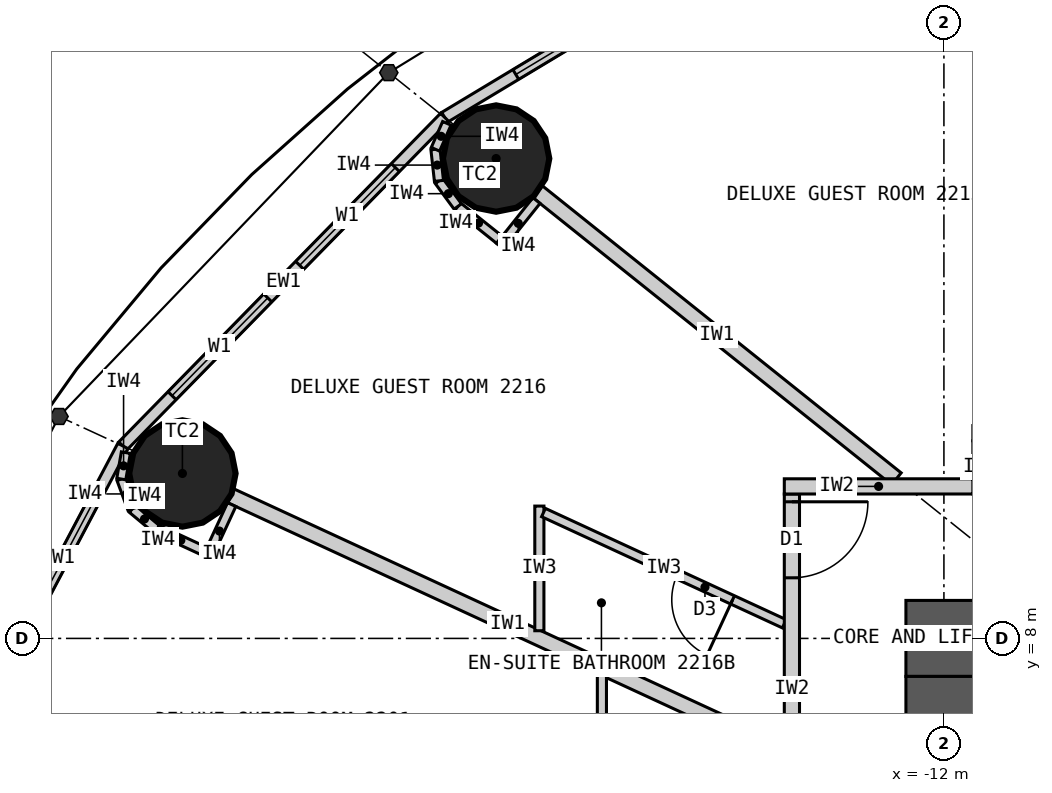
"""IFC4 building model, lengths in metres.
Left out: names, types, materials, properties, quantities, classifications, styles, units other than length and angle.
Written with IfcOpenShell. Run it as: python <this file> out.ifc"""

import sys

from ifc_helpers import new_model, si_unit, direction, frame, frame_2d, origin, origin_2d, place, context, subcontext, project, spatial, rectangle, circle, extrude, element, fill, save


model = new_model("IFC4")
c1 = context("Model", 3, precision=1e-05, world=origin(), true_north=direction((0.0, 1.0)))
c2 = subcontext(c1, "Body", "Model", "MODEL_VIEW")
j1 = project(units=[si_unit("LENGTHUNIT", "METRE"), si_unit("PLANEANGLEUNIT", "RADIAN")], contexts=[c1])
p1 = place(None, origin())
s1 = spatial("IfcSite", under=j1, at=p1, CompositionType="ELEMENT")
p2 = place(p1, origin())
s2 = spatial("IfcBuilding", under=s1, at=p2, CompositionType="ELEMENT")
p3 = place(p2, frame((0.0, 0.0, 87.0)))
s3 = spatial("IfcBuildingStorey", under=s2, at=p3, CompositionType="ELEMENT", Elevation=87.0)
for number, where, z_axis, x_axis in (
    (1, (-17.892, 14.313, 0.0), (0.0, 0.0, 1.0), (1.0, 0.0, 0.0)),
    (2, (-22.019, 10.17, 0.0), (0.0, 0.0, 1.0), (1.0, 0.0, 0.0)),
):
    element("IfcColumn", number, at=place(p3, frame(where, z_axis=z_axis, x_axis=x_axis)), inside=s3, PredefinedType="COLUMN", context=c2, shape_type="SweptSolid", body=[
        extrude(circle(Radius=0.7, at=origin_2d()), origin(), (0.0, 0.0, 1.0), 3.3),
    ])
p4 = place(p3, frame((-12.5, 8.0, 0.0), z_axis=(0.0, 0.0, 1.0), x_axis=(1.0, 0.0, 0.0)))
e3 = element("IfcWall", 3, at=p4, inside=s3, PredefinedType="SHEAR", context=c2, shape_type="SweptSolid", body=[
    extrude(rectangle(XDim=25.0, YDim=1.0, at=frame_2d((12.5, 0.0))), origin(), (0.0, 0.0, 1.0), 3.3),
])
p5 = place(p4, frame((11.2, 0.0, 0.0)))
e4 = element("IfcOpeningElement", 4, at=p5, cuts=e3, PredefinedType="OPENING", context=c2, shape_type="SweptSolid", body=[
    extrude(rectangle(XDim=1.2, YDim=2.2, at=frame_2d((0.6, 1.1))), frame((0.0, 0.51, 0.0), z_axis=(0.0, -1.0, 0.0), x_axis=(1.0, 0.0, 0.0)), (0.0, 0.0, 1.0), 1.02),
])
p6 = place(p4, frame((18.8, 0.0, 0.0)))
e5 = element("IfcOpeningElement", 5, at=p6, cuts=e3, PredefinedType="OPENING", context=c2, shape_type="SweptSolid", body=[
    extrude(rectangle(XDim=0.9, YDim=2.2, at=frame_2d((0.45, 1.1))), frame((0.0, 0.51, 0.0), z_axis=(0.0, -1.0, 0.0), x_axis=(1.0, 0.0, 0.0)), (0.0, 0.0, 1.0), 1.02),
])
p7 = place(p3, frame((-12.0, 7.5, 0.0), z_axis=(0.0, 0.0, 1.0), x_axis=(0.0, -1.0, 0.0)))
e6 = element("IfcWall", 6, at=p7, inside=s3, PredefinedType="SHEAR", context=c2, shape_type="SweptSolid", body=[
    extrude(rectangle(XDim=15.0, YDim=1.0, at=frame_2d((7.5, 0.0))), origin(), (0.0, 0.0, 1.0), 3.3),
])
p8 = place(p7, frame((6.6, 0.0, 0.0)))
e7 = element("IfcOpeningElement", 7, at=p8, cuts=e6, PredefinedType="OPENING", context=c2, shape_type="SweptSolid", body=[
    extrude(rectangle(XDim=1.8, YDim=2.2, at=frame_2d((0.9, 1.1))), frame((0.0, 0.51, 0.0), z_axis=(0.0, -1.0, 0.0), x_axis=(1.0, 0.0, 0.0)), (0.0, 0.0, 1.0), 1.02),
])
p9 = place(p3, frame((-13.096, 18.147, 0.0), z_axis=(0.0, 0.0, 1.0), x_axis=(-0.856983180864, -0.515344377787, 0.0)))
e8 = element("IfcWall", 8, at=p9, inside=s3, PredefinedType="ELEMENTEDWALL", context=c2, shape_type="SweptSolid", body=[
    extrude(rectangle(XDim=6.386, YDim=0.15, at=frame_2d((3.193, 0.0))), origin(), (0.0, 0.0, 1.0), 3.12),
])
p10 = place(p9, frame((1.093, 0.0, 0.9)))
e9 = element("IfcOpeningElement", 9, at=p10, cuts=e8, PredefinedType="OPENING", context=c2, shape_type="SweptSolid", body=[
    extrude(rectangle(XDim=1.8, YDim=1.9, at=frame_2d((0.9, 0.95))), frame((0.0, 0.085, 0.0), z_axis=(0.0, -1.0, 0.0), x_axis=(1.0, 0.0, 0.0)), (0.0, 0.0, 1.0), 0.17),
])
p11 = place(p9, frame((3.493, 0.0, 0.9)))
e10 = element("IfcOpeningElement", 10, at=p11, cuts=e8, PredefinedType="OPENING", context=c2, shape_type="SweptSolid", body=[
    extrude(rectangle(XDim=1.8, YDim=1.9, at=frame_2d((0.9, 0.95))), frame((0.0, 0.085, 0.0), z_axis=(0.0, -1.0, 0.0), x_axis=(1.0, 0.0, 0.0)), (0.0, 0.0, 1.0), 0.17),
])
p12 = place(p3, frame((-18.57, 14.856, 0.0), z_axis=(0.0, 0.0, 1.0), x_axis=(-0.699602905915, -0.714531856557, 0.0)))
e11 = element("IfcWall", 11, at=p12, inside=s3, PredefinedType="ELEMENTEDWALL", context=c2, shape_type="SweptSolid", body=[
    extrude(rectangle(XDim=6.051, YDim=0.15, at=frame_2d((3.025, 0.0))), origin(), (0.0, 0.0, 1.0), 3.12),
])
p13 = place(p12, frame((0.926, 0.0, 0.9)))
e12 = element("IfcOpeningElement", 12, at=p13, cuts=e11, PredefinedType="OPENING", context=c2, shape_type="SweptSolid", body=[
    extrude(rectangle(XDim=1.8, YDim=1.9, at=frame_2d((0.9, 0.95))), frame((0.0, 0.085, 0.0), z_axis=(0.0, -1.0, 0.0), x_axis=(1.0, 0.0, 0.0)), (0.0, 0.0, 1.0), 0.17),
])
p14 = place(p12, frame((3.325, 0.0, 0.9)))
e13 = element("IfcOpeningElement", 13, at=p14, cuts=e11, PredefinedType="OPENING", context=c2, shape_type="SweptSolid", body=[
    extrude(rectangle(XDim=1.8, YDim=1.9, at=frame_2d((0.9, 0.95))), frame((0.0, 0.085, 0.0), z_axis=(0.0, -1.0, 0.0), x_axis=(1.0, 0.0, 0.0)), (0.0, 0.0, 1.0), 0.17),
])
p15 = place(p3, frame((-22.803, 10.532, 0.0), z_axis=(0.0, 0.0, 1.0), x_axis=(-0.467296867008, -0.884100468321, 0.0)))
e14 = element("IfcWall", 14, at=p15, inside=s3, PredefinedType="ELEMENTEDWALL", context=c2, shape_type="SweptSolid", body=[
    extrude(rectangle(XDim=5.734, YDim=0.15, at=frame_2d((2.867, 0.0))), origin(), (0.0, 0.0, 1.0), 3.12),
])
p16 = place(p15, frame((0.767, 0.0, 0.9)))
e15 = element("IfcOpeningElement", 15, at=p16, cuts=e14, PredefinedType="OPENING", context=c2, shape_type="SweptSolid", body=[
    extrude(rectangle(XDim=1.8, YDim=1.9, at=frame_2d((0.9, 0.95))), frame((0.0, 0.085, 0.0), z_axis=(0.0, -1.0, 0.0), x_axis=(1.0, 0.0, 0.0)), (0.0, 0.0, 1.0), 0.17),
])
p17 = place(p15, frame((3.167, 0.0, 0.9)))
e16 = element("IfcOpeningElement", 16, at=p17, cuts=e14, PredefinedType="OPENING", context=c2, shape_type="SweptSolid", body=[
    extrude(rectangle(XDim=1.8, YDim=1.9, at=frame_2d((0.9, 0.95))), frame((0.0, 0.085, 0.0), z_axis=(0.0, -1.0, 0.0), x_axis=(1.0, 0.0, 0.0)), (0.0, 0.0, 1.0), 0.17),
])
p18 = place(p3, frame((-7.289, 10.1, 0.0), z_axis=(0.0, 0.0, 1.0), x_axis=(-0.585198353053, 0.810890182197, 0.0)))
e17 = element("IfcWall", 17, at=p18, inside=s3, PredefinedType="PARTITIONING", context=c2, shape_type="SweptSolid", body=[
    extrude(rectangle(XDim=8.36, YDim=0.2, at=frame_2d((4.18, 0.0))), origin(), (0.0, 0.0, 1.0), 2.27),
])
p19 = place(p3, frame((-12.625, 10.1, 0.0), z_axis=(0.0, 0.0, 1.0), x_axis=(-0.780892451574, 0.624665493744, 0.0)))
e18 = element("IfcWall", 18, at=p19, inside=s3, PredefinedType="PARTITIONING", context=c2, shape_type="SweptSolid", body=[
    extrude(rectangle(XDim=6.045, YDim=0.2, at=frame_2d((3.022, 0.0))), origin(), (0.0, 0.0, 1.0), 2.27),
])
p20 = place(p3, frame((-14.1, 6.512, 0.0), z_axis=(0.0, 0.0, 1.0), x_axis=(-0.907832871056, 0.419332181247, 0.0)))
e19 = element("IfcWall", 19, at=p20, inside=s3, PredefinedType="PARTITIONING", context=c2, shape_type="SweptSolid", body=[
    extrude(rectangle(XDim=8.023, YDim=0.2, at=frame_2d((4.011, 0.0))), origin(), (0.0, 0.0, 1.0), 2.22),
])
p21 = place(p3, frame((-16.5, 7.521, 0.0), z_axis=(0.0, 0.0, 1.0), x_axis=(0.0, -1.0, 0.0)))
e20 = element("IfcWall", 20, at=p21, inside=s3, PredefinedType="PARTITIONING", context=c2, shape_type="SweptSolid", body=[
    extrude(rectangle(XDim=2.749, YDim=0.12, at=frame_2d((1.374, 0.0))), origin(), (0.0, 0.0, 1.0), 3.12),
])
p22 = place(p3, frame((-17.323, 8.101, 0.0), z_axis=(0.0, 0.0, 1.0), x_axis=(0.0, 1.0, 0.0)))
e21 = element("IfcWall", 21, at=p22, inside=s3, PredefinedType="PARTITIONING", context=c2, shape_type="SweptSolid", body=[
    extrude(rectangle(XDim=1.64, YDim=0.12, at=frame_2d((0.82, 0.0))), origin(), (0.0, 0.0, 1.0), 3.12),
])
p23 = place(p3, frame((-14.1, 8.193, 0.0), z_axis=(0.0, 0.0, 1.0), x_axis=(-0.907836493557, 0.419324338628, 0.0)))
e22 = element("IfcWall", 22, at=p23, inside=s3, PredefinedType="PARTITIONING", context=c2, shape_type="SweptSolid", body=[
    extrude(rectangle(XDim=3.49, YDim=0.12, at=frame_2d((1.745, 0.0))), origin(), (0.0, 0.0, 1.0), 3.12),
])
p24 = place(p23, frame((0.75, 0.0, 0.0)))
e23 = element("IfcOpeningElement", 23, at=p24, cuts=e22, PredefinedType="OPENING", context=c2, shape_type="SweptSolid", body=[
    extrude(rectangle(XDim=0.8, YDim=2.1, at=frame_2d((0.4, 1.05))), frame((0.0, 0.07, 0.0), z_axis=(0.0, -1.0, 0.0), x_axis=(1.0, 0.0, 0.0)), (0.0, 0.0, 1.0), 0.14),
])
p25 = place(p3, frame((-14.0, 9.9, 0.0), z_axis=(0.0, 0.0, 1.0), x_axis=(0.0, -1.0, 0.0)))
e24 = element("IfcWall", 24, at=p25, inside=s3, PredefinedType="PARTITIONING", context=c2, shape_type="SweptSolid", body=[
    extrude(rectangle(XDim=5.127, YDim=0.2, at=frame_2d((2.564, 0.0))), origin(), (0.0, 0.0, 1.0), 3.12),
])
p26 = place(p25, frame((0.103, 0.0, 0.0)))
e25 = element("IfcOpeningElement", 25, at=p26, cuts=e24, PredefinedType="OPENING", context=c2, shape_type="SweptSolid", body=[
    extrude(rectangle(XDim=1.0, YDim=2.2, at=frame_2d((0.5, 1.1))), frame((0.0, 0.11, 0.0), z_axis=(0.0, -1.0, 0.0), x_axis=(1.0, 0.0, 0.0)), (0.0, 0.0, 1.0), 0.22),
])
p27 = place(p3, frame((-14.1, 10.0, 0.0), z_axis=(0.0, 0.0, 1.0), x_axis=(1.0, 0.0, 0.0)))
e26 = element("IfcWall", 26, at=p27, inside=s3, PredefinedType="PARTITIONING", context=c2, shape_type="SweptSolid", body=[
    extrude(rectangle(XDim=2.481, YDim=0.2, at=frame_2d((1.24, 0.0))), origin(), (0.0, 0.0, 1.0), 3.12),
])
p28 = place(p3, frame((-17.361, 13.76, 0.0), z_axis=(0.0, 0.0, 1.0), x_axis=(-0.624501042889, -0.781023973659, 0.0)))
e27 = element("IfcWall", 27, at=p28, inside=s3, PredefinedType="PARTITIONING", context=c2, shape_type="SweptSolid", body=[
    extrude(rectangle(XDim=0.767, YDim=0.12, at=frame_2d((0.384, 0.0))), origin(), (0.0, 0.0, 1.0), 3.12),
])
p29 = place(p3, frame((-17.85, 13.246, 0.0), z_axis=(0.0, 0.0, 1.0), x_axis=(-0.780902834923, 0.62465251333, 0.0)))
e28 = element("IfcWall", 28, at=p29, inside=s3, PredefinedType="PARTITIONING", context=c2, shape_type="SweptSolid", body=[
    extrude(rectangle(XDim=0.7, YDim=0.12, at=frame_2d((0.35, 0.0))), origin(), (0.0, 0.0, 1.0), 3.12),
])
for number, where, z_axis, x_axis in (
    (29, (-18.396, 13.683, 0.0), (0.0, 0.0, 1.0), (-0.592, 0.806, 0.0)),
    (30, (-18.644, 14.02, 0.0), (0.0, 0.0, 1.0), (-0.11, 0.994, 0.0)),
):
    element("IfcWall", number, at=place(p3, frame(where, z_axis=z_axis, x_axis=x_axis)), inside=s3, PredefinedType="PARTITIONING", context=c2, shape_type="SweptSolid", body=[
        extrude(rectangle(XDim=0.418, YDim=0.12, at=frame_2d((0.209, 0.0))), origin(), (0.0, 0.0, 1.0), 3.12),
    ])
p30 = place(p3, frame((-18.69, 14.435, 0.0), z_axis=(0.0, 0.0, 1.0), x_axis=(0.401093412634, 0.91603715773, 0.0)))
e31 = element("IfcWall", 31, at=p30, inside=s3, PredefinedType="PARTITIONING", context=c2, shape_type="SweptSolid", body=[
    extrude(rectangle(XDim=0.373, YDim=0.12, at=frame_2d((0.187, 0.0))), origin(), (0.0, 0.0, 1.0), 3.12),
])
p31 = place(p3, frame((-21.371, 9.761, 0.0), z_axis=(0.0, 0.0, 1.0), x_axis=(-0.419259891039, -0.907866258744, 0.0)))
e32 = element("IfcWall", 32, at=p31, inside=s3, PredefinedType="PARTITIONING", context=c2, shape_type="SweptSolid", body=[
    extrude(rectangle(XDim=0.768, YDim=0.12, at=frame_2d((0.384, 0.0))), origin(), (0.0, 0.0, 1.0), 3.12),
])
p32 = place(p3, frame((-21.722, 9.144, 0.0), z_axis=(0.0, 0.0, 1.0), x_axis=(-0.907877701396, 0.419235112208, 0.0)))
e33 = element("IfcWall", 33, at=p32, inside=s3, PredefinedType="PARTITIONING", context=c2, shape_type="SweptSolid", body=[
    extrude(rectangle(XDim=0.7, YDim=0.12, at=frame_2d((0.35, 0.0))), origin(), (0.0, 0.0, 1.0), 3.12),
])
p33 = place(p3, frame((-22.358, 9.437, 0.0), z_axis=(0.0, 0.0, 1.0), x_axis=(-0.768412687942, 0.639954639806, 0.0)))
e34 = element("IfcWall", 34, at=p33, inside=s3, PredefinedType="PARTITIONING", context=c2, shape_type="SweptSolid", body=[
    extrude(rectangle(XDim=0.418, YDim=0.12, at=frame_2d((0.209, 0.0))), origin(), (0.0, 0.0, 1.0), 3.12),
])
p34 = place(p3, frame((-22.679, 9.705, 0.0), z_axis=(0.0, 0.0, 1.0), x_axis=(-0.345164001646, 0.938542386879, 0.0)))
e35 = element("IfcWall", 35, at=p34, inside=s3, PredefinedType="PARTITIONING", context=c2, shape_type="SweptSolid", body=[
    extrude(rectangle(XDim=0.418, YDim=0.12, at=frame_2d((0.209, 0.0))), origin(), (0.0, 0.0, 1.0), 3.12),
])
p35 = place(p3, frame((-22.823, 10.097, 0.0), z_axis=(0.0, 0.0, 1.0), x_axis=(0.169674995186, 0.985500074079, 0.0)))
e36 = element("IfcWall", 36, at=p35, inside=s3, PredefinedType="PARTITIONING", context=c2, shape_type="SweptSolid", body=[
    extrude(rectangle(XDim=0.353, YDim=0.12, at=frame_2d((0.176, 0.0))), origin(), (0.0, 0.0, 1.0), 3.12),
])
p36 = place(p11, origin())
e37 = element("IfcWindow", 37, at=p36, inside=s3, PartitioningType="SINGLE_PANEL", PredefinedType="WINDOW", context=c2, shape_type="SweptSolid", body=[
    extrude(rectangle(XDim=1.8, YDim=1.9, at=frame_2d((0.9, 0.95))), frame((0.0, 0.03, 0.0), z_axis=(0.0, -1.0, 0.0), x_axis=(1.0, 0.0, 0.0)), (0.0, 0.0, 1.0), 0.06),
])
fill(e10, e37)
p37 = place(p13, origin())
e38 = element("IfcWindow", 38, at=p37, inside=s3, PartitioningType="SINGLE_PANEL", PredefinedType="WINDOW", context=c2, shape_type="SweptSolid", body=[
    extrude(rectangle(XDim=1.8, YDim=1.9, at=frame_2d((0.9, 0.95))), frame((0.0, 0.03, 0.0), z_axis=(0.0, -1.0, 0.0), x_axis=(1.0, 0.0, 0.0)), (0.0, 0.0, 1.0), 0.06),
])
fill(e12, e38)
p38 = place(p14, origin())
e39 = element("IfcWindow", 39, at=p38, inside=s3, PartitioningType="SINGLE_PANEL", PredefinedType="WINDOW", context=c2, shape_type="SweptSolid", body=[
    extrude(rectangle(XDim=1.8, YDim=1.9, at=frame_2d((0.9, 0.95))), frame((0.0, 0.03, 0.0), z_axis=(0.0, -1.0, 0.0), x_axis=(1.0, 0.0, 0.0)), (0.0, 0.0, 1.0), 0.06),
])
fill(e13, e39)
p39 = place(p16, origin())
e40 = element("IfcWindow", 40, at=p39, inside=s3, PartitioningType="SINGLE_PANEL", PredefinedType="WINDOW", context=c2, shape_type="SweptSolid", body=[
    extrude(rectangle(XDim=1.8, YDim=1.9, at=frame_2d((0.9, 0.95))), frame((0.0, 0.03, 0.0), z_axis=(0.0, -1.0, 0.0), x_axis=(1.0, 0.0, 0.0)), (0.0, 0.0, 1.0), 0.06),
])
fill(e15, e40)
p40 = place(p24, origin())
e41 = element("IfcDoor", 41, at=p40, inside=s3, OperationType="SINGLE_SWING_LEFT", PredefinedType="DOOR", context=c2, shape_type="SweptSolid", body=[
    extrude(rectangle(XDim=0.8, YDim=2.1, at=frame_2d((0.4, 1.05))), frame((0.0, 0.025, 0.0), z_axis=(0.0, -1.0, 0.0), x_axis=(1.0, 0.0, 0.0)), (0.0, 0.0, 1.0), 0.05),
])
fill(e23, e41)
p41 = place(p26, origin())
e42 = element("IfcDoor", 42, at=p41, inside=s3, OperationType="SINGLE_SWING_LEFT", PredefinedType="DOOR", context=c2, shape_type="SweptSolid", body=[
    extrude(rectangle(XDim=1.0, YDim=2.2, at=frame_2d((0.5, 1.1))), frame((0.0, 0.025, 0.0), z_axis=(0.0, -1.0, 0.0), x_axis=(1.0, 0.0, 0.0)), (0.0, 0.0, 1.0), 0.05),
])
fill(e25, e42)
save(model, sys.argv[1])
